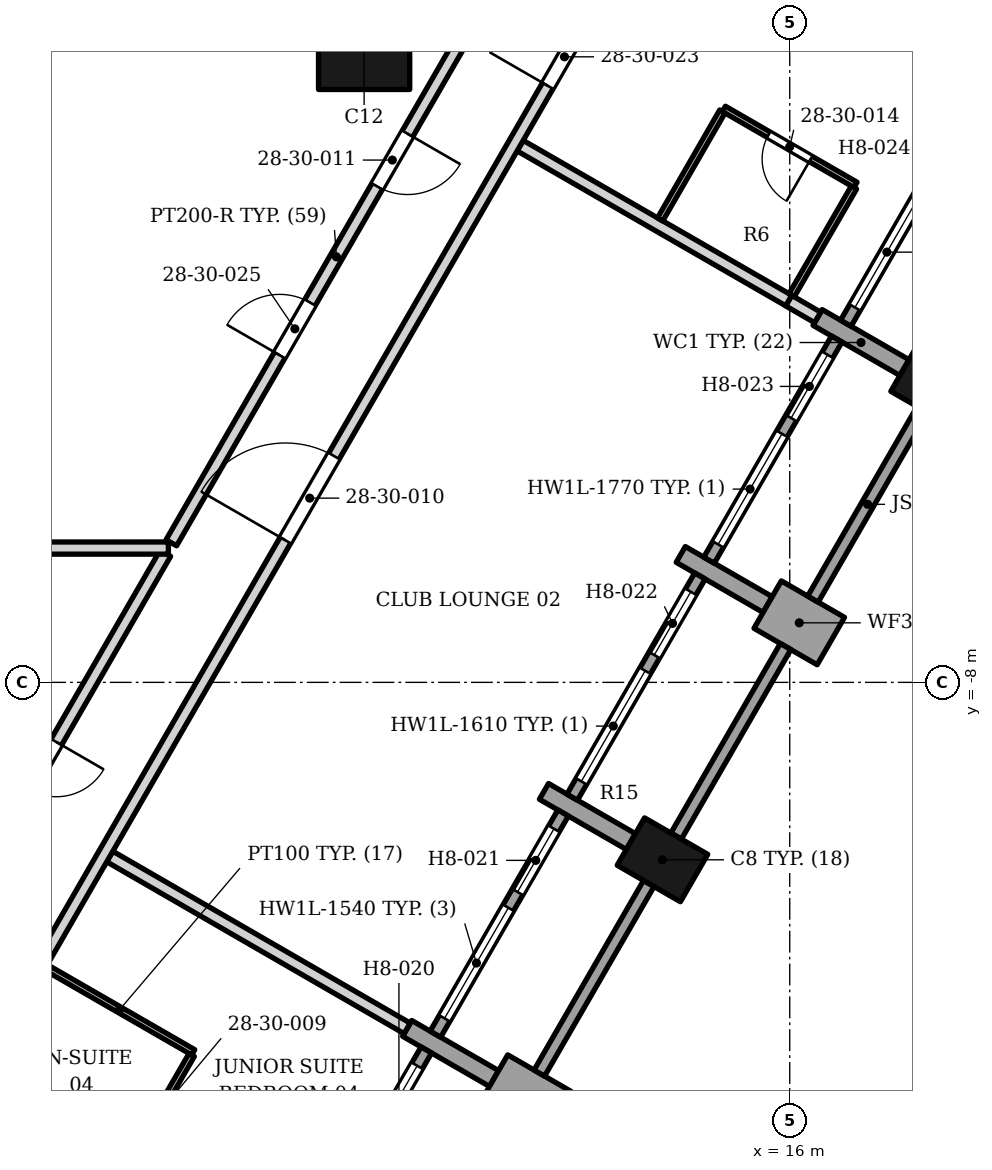
"""IFC4 building model, lengths in metres.
Left out: names, types, materials, properties, quantities, classifications, styles, units other than length and angle.
Written with IfcOpenShell. Run it as: python <this file> out.ifc"""

import sys

from ifc_helpers import new_model, si_unit, direction, frame, frame_2d, origin, origin_2d, place, context, subcontext, project, spatial, rectangle, extrude, element, fill, save


model = new_model("IFC4")
c1 = context("Model", 3, precision=1e-05, world=origin(), true_north=direction((0.0, 1.0)))
c2 = subcontext(c1, "Body", "Model", "MODEL_VIEW")
j1 = project(units=[si_unit("LENGTHUNIT", "METRE"), si_unit("PLANEANGLEUNIT", "RADIAN")], contexts=[c1])
p1 = place(None, origin())
s1 = spatial("IfcSite", under=j1, at=p1, CompositionType="ELEMENT")
p2 = place(p1, origin())
s2 = spatial("IfcBuilding", under=s1, at=p2, CompositionType="ELEMENT")
p3 = place(p2, frame((0.0, 0.0, 122.4)))
s3 = spatial("IfcBuildingStorey", under=s2, at=p3, CompositionType="ELEMENT", Elevation=122.4)
p4 = place(p3, frame((9.0, 2.5, 0.0), z_axis=(0.0, 0.0, 1.0), x_axis=(1.0, 0.0, 0.0)))
e1 = element("IfcColumn", 1, at=p4, inside=s3, PredefinedType="COLUMN", context=c2, shape_type="SweptSolid", body=[
    extrude(rectangle(XDim=1.5, YDim=1.5, at=origin_2d()), origin(), (0.0, 0.0, 1.0), 3.4),
])
for number, where, z_axis, x_axis in (
    (2, (13.907, -10.918, 0.0), (0.0, 0.0, 1.0), (0.5, 0.866, 0.0)),
    (3, (18.407, -3.124, 0.0), (0.0, 0.0, 1.0), (0.5, 0.866, 0.0)),
):
    element("IfcColumn", number, at=place(p3, frame(where, z_axis=z_axis, x_axis=x_axis)), inside=s3, PredefinedType="COLUMN", context=c2, shape_type="SweptSolid", body=[
        extrude(rectangle(XDim=0.9, YDim=1.2, at=origin_2d()), origin(), (0.0, 0.0, 1.0), 3.4),
    ])
p5 = place(p3, frame((12.176, -15.115, 0.0), z_axis=(0.0, 0.0, 1.0), x_axis=(-0.866094119867, 0.499880961361, 0.0)))
e4 = element("IfcWall", 4, at=p5, inside=s3, PredefinedType="SOLIDWALL", context=c2, shape_type="SweptSolid", body=[
    extrude(rectangle(XDim=1.2, YDim=0.9, at=frame_2d((0.6, 0.0))), origin(), (0.0, 0.0, 1.0), 2.63),
])
p6 = place(p3, frame((9.708, -13.69, 0.0), z_axis=(0.0, 0.0, 1.0), x_axis=(0.866040211805, -0.499974350878, 0.0)))
e5 = element("IfcWall", 5, at=p6, inside=s3, PredefinedType="SOLIDWALL", context=c2, shape_type="SweptSolid", body=[
    extrude(rectangle(XDim=1.65, YDim=0.3, at=frame_2d((0.825, 0.0))), origin(), (0.0, 0.0, 1.0), 2.65),
])
p7 = place(p3, frame((11.958, -9.793, 0.0), z_axis=(0.0, 0.0, 1.0), x_axis=(0.866040211805, -0.499974350878, 0.0)))
e6 = element("IfcWall", 6, at=p7, inside=s3, PredefinedType="SOLIDWALL", context=c2, shape_type="SweptSolid", body=[
    extrude(rectangle(XDim=1.65, YDim=0.3, at=frame_2d((0.825, 0.0))), origin(), (0.0, 0.0, 1.0), 2.308),
])
p8 = place(p3, frame((15.637, -6.721, 0.0), z_axis=(0.0, 0.0, 1.0), x_axis=(0.866094119867, -0.499880961361, 0.0)))
e7 = element("IfcWall", 7, at=p8, inside=s3, PredefinedType="SOLIDWALL", context=c2, shape_type="SweptSolid", body=[
    extrude(rectangle(XDim=1.2, YDim=0.9, at=frame_2d((0.6, 0.0))), origin(), (0.0, 0.0, 1.0), 2.474),
])
p9 = place(p3, frame((15.637, -6.721, 0.0), z_axis=(0.0, 0.0, 1.0), x_axis=(-0.865976140824, 0.500085316245, 0.0)))
e8 = element("IfcWall", 8, at=p9, inside=s3, PredefinedType="SOLIDWALL", context=c2, shape_type="SweptSolid", body=[
    extrude(rectangle(XDim=1.65, YDim=0.3, at=frame_2d((0.825, 0.0))), origin(), (0.0, 0.0, 1.0), 2.474),
])
p10 = place(p3, frame((16.458, -1.999, 0.0), z_axis=(0.0, 0.0, 1.0), x_axis=(0.866040211805, -0.499974350878, 0.0)))
e9 = element("IfcWall", 9, at=p10, inside=s3, PredefinedType="SOLIDWALL", context=c2, shape_type="SweptSolid", body=[
    extrude(rectangle(XDim=1.65, YDim=0.3, at=frame_2d((0.825, 0.0))), origin(), (0.0, 0.0, 1.0), 2.65),
])
p11 = place(p3, frame((7.923, -17.682, 0.0), z_axis=(0.0, 0.0, 1.0), x_axis=(0.499958946799, 0.866049104564, 0.0)))
e10 = element("IfcWall", 10, at=p11, inside=s3, PredefinedType="ELEMENTEDWALL", context=c2, shape_type="SweptSolid", body=[
    extrude(rectangle(XDim=4.2, YDim=0.2, at=frame_2d((2.1, 0.0))), origin(), (0.0, 0.0, 1.0), 2.65),
])
p12 = place(p11, frame((0.3, 0.0, 0.6)))
e11 = element("IfcOpeningElement", 11, at=p12, cuts=e10, PredefinedType="OPENING", context=c2, shape_type="SweptSolid", body=[
    extrude(rectangle(XDim=2.1, YDim=1.8, at=frame_2d((1.05, 0.9))), frame((0.0, 0.11, 0.0), z_axis=(0.0, -1.0, 0.0), x_axis=(1.0, 0.0, 0.0)), (0.0, 0.0, 1.0), 0.22),
])
p13 = place(p11, frame((2.7, 0.0, 0.0)))
e12 = element("IfcOpeningElement", 12, at=p13, cuts=e10, PredefinedType="OPENING", context=c2, shape_type="SweptSolid", body=[
    extrude(rectangle(XDim=1.2, YDim=2.4, at=frame_2d((0.6, 1.2))), frame((0.0, 0.11, 0.0), z_axis=(0.0, -1.0, 0.0), x_axis=(1.0, 0.0, 0.0)), (0.0, 0.0, 1.0), 0.22),
])
p14 = place(p3, frame((11.882, -14.425, 0.0), z_axis=(0.0, 0.0, 1.0), x_axis=(0.500012057535, 0.866018442252, 0.0)))
e13 = element("IfcWall", 13, at=p14, inside=s3, PredefinedType="SOLIDWALL", context=c2, shape_type="SweptSolid", body=[
    extrude(rectangle(XDim=3.6, YDim=0.2, at=frame_2d((1.8, 0.0))), origin(), (0.0, 0.0, 1.0), 2.374),
])
p15 = place(p3, frame((10.173, -13.785, 0.0), z_axis=(0.0, 0.0, 1.0), x_axis=(0.49998411664, 0.866034573852, 0.0)))
e14 = element("IfcWall", 14, at=p15, inside=s3, PredefinedType="ELEMENTEDWALL", context=c2, shape_type="SweptSolid", body=[
    extrude(rectangle(XDim=4.2, YDim=0.2, at=frame_2d((2.1, 0.0))), origin(), (0.0, 0.0, 1.0), 2.242),
])
p16 = place(p15, frame((0.3, 0.0, 0.6)))
e15 = element("IfcOpeningElement", 15, at=p16, cuts=e14, PredefinedType="OPENING", context=c2, shape_type="SweptSolid", body=[
    extrude(rectangle(XDim=2.1, YDim=1.54, at=frame_2d((1.05, 0.77))), frame((0.0, 0.11, 0.0), z_axis=(0.0, -1.0, 0.0), x_axis=(1.0, 0.0, 0.0)), (0.0, 0.0, 1.0), 0.22),
])
p17 = place(p15, frame((2.7, 0.0, 0.0)))
e16 = element("IfcOpeningElement", 16, at=p17, cuts=e14, PredefinedType="OPENING", context=c2, shape_type="SweptSolid", body=[
    extrude(rectangle(XDim=1.2, YDim=2.14, at=frame_2d((0.6, 1.07))), frame((0.0, 0.11, 0.0), z_axis=(0.0, -1.0, 0.0), x_axis=(1.0, 0.0, 0.0)), (0.0, 0.0, 1.0), 0.22),
])
p18 = place(p3, frame((14.132, -10.528, 0.0), z_axis=(0.0, 0.0, 1.0), x_axis=(0.500012057535, 0.866018442252, 0.0)))
e17 = element("IfcWall", 17, at=p18, inside=s3, PredefinedType="SOLIDWALL", context=c2, shape_type="SweptSolid", body=[
    extrude(rectangle(XDim=3.6, YDim=0.2, at=frame_2d((1.8, 0.0))), origin(), (0.0, 0.0, 1.0), 2.63),
])
p19 = place(p3, frame((12.423, -9.888, 0.0), z_axis=(0.0, 0.0, 1.0), x_axis=(0.49998411664, 0.866034573852, 0.0)))
e18 = element("IfcWall", 18, at=p19, inside=s3, PredefinedType="ELEMENTEDWALL", context=c2, shape_type="SweptSolid", body=[
    extrude(rectangle(XDim=4.2, YDim=0.2, at=frame_2d((2.1, 0.0))), origin(), (0.0, 0.0, 1.0), 2.308),
])
p20 = place(p19, frame((0.3, 0.0, 0.6)))
e19 = element("IfcOpeningElement", 19, at=p20, cuts=e18, PredefinedType="OPENING", context=c2, shape_type="SweptSolid", body=[
    extrude(rectangle(XDim=2.1, YDim=1.61, at=frame_2d((1.05, 0.805))), frame((0.0, 0.11, 0.0), z_axis=(0.0, -1.0, 0.0), x_axis=(1.0, 0.0, 0.0)), (0.0, 0.0, 1.0), 0.22),
])
p21 = place(p19, frame((2.7, 0.0, 0.0)))
e20 = element("IfcOpeningElement", 20, at=p21, cuts=e18, PredefinedType="OPENING", context=c2, shape_type="SweptSolid", body=[
    extrude(rectangle(XDim=1.2, YDim=2.21, at=frame_2d((0.6, 1.105))), frame((0.0, 0.11, 0.0), z_axis=(0.0, -1.0, 0.0), x_axis=(1.0, 0.0, 0.0)), (0.0, 0.0, 1.0), 0.22),
])
p22 = place(p3, frame((16.382, -6.631, 0.0), z_axis=(0.0, 0.0, 1.0), x_axis=(0.500012057535, 0.866018442252, 0.0)))
e21 = element("IfcWall", 21, at=p22, inside=s3, PredefinedType="SOLIDWALL", context=c2, shape_type="SweptSolid", body=[
    extrude(rectangle(XDim=3.6, YDim=0.2, at=frame_2d((1.8, 0.0))), origin(), (0.0, 0.0, 1.0), 2.63),
])
p23 = place(p3, frame((14.673, -5.991, 0.0), z_axis=(0.0, 0.0, 1.0), x_axis=(0.499958946799, 0.866049104564, 0.0)))
e22 = element("IfcWall", 22, at=p23, inside=s3, PredefinedType="ELEMENTEDWALL", context=c2, shape_type="SweptSolid", body=[
    extrude(rectangle(XDim=4.2, YDim=0.2, at=frame_2d((2.1, 0.0))), origin(), (0.0, 0.0, 1.0), 2.474),
])
p24 = place(p23, frame((0.3, 0.0, 0.6)))
e23 = element("IfcOpeningElement", 23, at=p24, cuts=e22, PredefinedType="OPENING", context=c2, shape_type="SweptSolid", body=[
    extrude(rectangle(XDim=2.1, YDim=1.77, at=frame_2d((1.05, 0.885))), frame((0.0, 0.11, 0.0), z_axis=(0.0, -1.0, 0.0), x_axis=(1.0, 0.0, 0.0)), (0.0, 0.0, 1.0), 0.22),
])
p25 = place(p23, frame((2.7, 0.0, 0.0)))
e24 = element("IfcOpeningElement", 24, at=p25, cuts=e22, PredefinedType="OPENING", context=c2, shape_type="SweptSolid", body=[
    extrude(rectangle(XDim=1.2, YDim=2.37, at=frame_2d((0.6, 1.185))), frame((0.0, 0.11, 0.0), z_axis=(0.0, -1.0, 0.0), x_axis=(1.0, 0.0, 0.0)), (0.0, 0.0, 1.0), 0.22),
])
p26 = place(p3, frame((16.923, -2.094, 0.0), z_axis=(0.0, 0.0, 1.0), x_axis=(0.49998411664, 0.866034573852, 0.0)))
e25 = element("IfcWall", 25, at=p26, inside=s3, PredefinedType="ELEMENTEDWALL", context=c2, shape_type="SweptSolid", body=[
    extrude(rectangle(XDim=4.2, YDim=0.2, at=frame_2d((2.1, 0.0))), origin(), (0.0, 0.0, 1.0), 2.65),
])
p27 = place(p26, frame((0.3, 0.0, 0.6)))
e26 = element("IfcOpeningElement", 26, at=p27, cuts=e25, PredefinedType="OPENING", context=c2, shape_type="SweptSolid", body=[
    extrude(rectangle(XDim=2.1, YDim=1.8, at=frame_2d((1.05, 0.9))), frame((0.0, 0.11, 0.0), z_axis=(0.0, -1.0, 0.0), x_axis=(1.0, 0.0, 0.0)), (0.0, 0.0, 1.0), 0.22),
])
p28 = place(p26, frame((2.7, 0.0, 0.0)))
e27 = element("IfcOpeningElement", 27, at=p28, cuts=e25, PredefinedType="OPENING", context=c2, shape_type="SweptSolid", body=[
    extrude(rectangle(XDim=1.2, YDim=2.4, at=frame_2d((0.6, 1.2))), frame((0.0, 0.11, 0.0), z_axis=(0.0, -1.0, 0.0), x_axis=(1.0, 0.0, 0.0)), (0.0, 0.0, 1.0), 0.22),
])
p29 = place(p3, frame((5.014, -16.116, 0.0), z_axis=(0.0, 0.0, 1.0), x_axis=(0.500617411337, 0.865668647617, 0.0)))
e28 = element("IfcWall", 28, at=p29, inside=s3, PredefinedType="PARTITIONING", context=c2, shape_type="SweptSolid", body=[
    extrude(rectangle(XDim=2.298, YDim=0.1, at=frame_2d((1.149, 0.0))), origin(), (0.0, 0.0, 1.0), 3.23),
])
p30 = place(p29, frame((0.748, 0.0, 0.0)))
e29 = element("IfcOpeningElement", 29, at=p30, cuts=e28, PredefinedType="OPENING", context=c2, shape_type="SweptSolid", body=[
    extrude(rectangle(XDim=0.8, YDim=2.1, at=frame_2d((0.4, 1.05))), frame((0.0, 0.06, 0.0), z_axis=(0.0, -1.0, 0.0), x_axis=(1.0, 0.0, 0.0)), (0.0, 0.0, 1.0), 0.12),
])
p31 = place(p3, frame((3.764, -12.685, 0.0), z_axis=(0.0, 0.0, 1.0), x_axis=(0.866326367614, -0.499478352661, 0.0)))
e30 = element("IfcWall", 30, at=p31, inside=s3, PredefinedType="PARTITIONING", context=c2, shape_type="SweptSolid", body=[
    extrude(rectangle(XDim=2.8, YDim=0.1, at=frame_2d((1.4, 0.0))), origin(), (0.0, 0.0, 1.0), 2.384),
])
p32 = place(p3, frame((1.647, -12.948, 0.0), z_axis=(0.0, 0.0, 1.0), x_axis=(0.500209850425, 0.865904212681, 0.0)))
e31 = element("IfcWall", 31, at=p32, inside=s3, PredefinedType="PARTITIONING", context=c2, shape_type="SweptSolid", body=[
    extrude(rectangle(XDim=8.166, YDim=0.2, at=frame_2d((4.083, 0.0))), origin(), (0.0, 0.0, 1.0), 2.242),
])
p33 = place(p32, frame((3.682, 0.0, 0.0)))
e32 = element("IfcOpeningElement", 32, at=p33, cuts=e31, PredefinedType="OPENING", context=c2, shape_type="SweptSolid", body=[
    extrude(rectangle(XDim=0.9, YDim=2.1, at=frame_2d((0.45, 1.05))), frame((0.0, 0.11, 0.0), z_axis=(0.0, -1.0, 0.0), x_axis=(1.0, 0.0, 0.0)), (0.0, 0.0, 1.0), 0.22),
])
p34 = place(p3, frame((4.816, -10.864, 0.0), z_axis=(0.0, 0.0, 1.0), x_axis=(0.865863825321, -0.500279757735, 0.0)))
e33 = element("IfcWall", 33, at=p34, inside=s3, PredefinedType="PARTITIONING", context=c2, shape_type="SweptSolid", body=[
    extrude(rectangle(XDim=5.65, YDim=0.2, at=frame_2d((2.825, 0.0))), origin(), (0.0, 0.0, 1.0), 2.242),
])
p35 = place(p3, frame((-5.812, -5.793, 0.0), z_axis=(0.0, 0.0, 1.0), x_axis=(0.999999989135, 0.000147408763, 0.0)))
e34 = element("IfcWall", 34, at=p35, inside=s3, PredefinedType="PARTITIONING", context=c2, shape_type="SweptSolid", body=[
    extrude(rectangle(XDim=11.594, YDim=0.2, at=frame_2d((5.797, 0.0))), origin(), (0.0, 0.0, 1.0), 3.23),
])
p36 = place(p3, frame((5.829, -5.705, 0.0), z_axis=(0.0, 0.0, 1.0), x_axis=(0.500142759665, 0.865942965763, 0.0)))
e35 = element("IfcWall", 35, at=p36, inside=s3, PredefinedType="PARTITIONING", context=c2, shape_type="SweptSolid", body=[
    extrude(rectangle(XDim=10.86, YDim=0.2, at=frame_2d((5.43, 0.0))), origin(), (0.0, 0.0, 1.0), 2.242),
])
p37 = place(p36, frame((6.768, 0.0, 0.0)))
e36 = element("IfcOpeningElement", 36, at=p37, cuts=e35, PredefinedType="OPENING", context=c2, shape_type="SweptSolid", body=[
    extrude(rectangle(XDim=1.0, YDim=2.1, at=frame_2d((0.5, 1.05))), frame((0.0, 0.11, 0.0), z_axis=(0.0, -1.0, 0.0), x_axis=(1.0, 0.0, 0.0)), (0.0, 0.0, 1.0), 0.22),
])
p38 = place(p36, frame((3.563, 0.0, 0.0)))
e37 = element("IfcOpeningElement", 37, at=p38, cuts=e35, PredefinedType="OPENING", context=c2, shape_type="SweptSolid", body=[
    extrude(rectangle(XDim=1.0, YDim=2.1, at=frame_2d((0.5, 1.05))), frame((0.0, 0.11, 0.0), z_axis=(0.0, -1.0, 0.0), x_axis=(1.0, 0.0, 0.0)), (0.0, 0.0, 1.0), 0.22),
])
p39 = place(p3, frame((15.983, -1.722, 0.0), z_axis=(0.0, 0.0, 1.0), x_axis=(0.864695615284, -0.502296220281, 0.0)))
e38 = element("IfcWall", 38, at=p39, inside=s3, PredefinedType="PARTITIONING", context=c2, shape_type="SweptSolid", body=[
    extrude(rectangle(XDim=0.55, YDim=0.2, at=frame_2d((0.275, 0.0))), origin(), (0.0, 0.0, 1.0), 3.23),
])
p40 = place(p3, frame((11.566, 0.826, 0.0), z_axis=(0.0, 0.0, 1.0), x_axis=(0.866318662666, -0.499491716364, 0.0)))
e39 = element("IfcWall", 39, at=p40, inside=s3, PredefinedType="PARTITIONING", context=c2, shape_type="SweptSolid", body=[
    extrude(rectangle(XDim=5.099, YDim=0.2, at=frame_2d((2.55, 0.0))), origin(), (0.0, 0.0, 1.0), 2.308),
])
p41 = place(p3, frame((16.031, -1.636, 0.0), z_axis=(0.0, 0.0, 1.0), x_axis=(0.500646589026, 0.865651773461, 0.0)))
e40 = element("IfcWall", 40, at=p41, inside=s3, PredefinedType="PARTITIONING", context=c2, shape_type="SweptSolid", body=[
    extrude(rectangle(XDim=2.05, YDim=0.1, at=frame_2d((1.025, 0.0))), origin(), (0.0, 0.0, 1.0), 3.23),
])
p42 = place(p3, frame((14.917, 1.432, 0.0), z_axis=(0.0, 0.0, 1.0), x_axis=(0.866022959057, -0.500004234368, 0.0)))
e41 = element("IfcWall", 41, at=p42, inside=s3, PredefinedType="PARTITIONING", context=c2, shape_type="SweptSolid", body=[
    extrude(rectangle(XDim=2.5, YDim=0.1, at=frame_2d((1.25, 0.0))), origin(), (0.0, 0.0, 1.0), 2.474),
])
p43 = place(p42, frame((0.85, 0.0, 0.0)))
e42 = element("IfcOpeningElement", 42, at=p43, cuts=e41, PredefinedType="OPENING", context=c2, shape_type="SweptSolid", body=[
    extrude(rectangle(XDim=0.8, YDim=2.1, at=frame_2d((0.4, 1.05))), frame((0.0, 0.06, 0.0), z_axis=(0.0, -1.0, 0.0), x_axis=(1.0, 0.0, 0.0)), (0.0, 0.0, 1.0), 0.12),
])
p44 = place(p3, frame((13.868, -0.387, 0.0), z_axis=(0.0, 0.0, 1.0), x_axis=(0.499265284884, 0.866449176415, 0.0)))
e43 = element("IfcWall", 43, at=p44, inside=s3, PredefinedType="PARTITIONING", context=c2, shape_type="SweptSolid", body=[
    extrude(rectangle(XDim=2.05, YDim=0.1, at=frame_2d((1.025, 0.0))), origin(), (0.0, 0.0, 1.0), 3.23),
])
p45 = place(p3, frame((0.23, -18.61, 0.0), z_axis=(0.0, 0.0, 1.0), x_axis=(0.499999197515, 0.866025867099, 0.0)))
e44 = element("IfcWall", 44, at=p45, inside=s3, PredefinedType="PARTITIONING", context=c2, shape_type="SweptSolid", body=[
    extrude(rectangle(XDim=25.76, YDim=0.2, at=frame_2d((12.88, 0.0))), origin(), (0.0, 0.0, 1.0), 2.242),
])
p46 = place(p45, frame((0.8, 0.0, 0.0)))
e45 = element("IfcOpeningElement", 45, at=p46, cuts=e44, PredefinedType="OPENING", context=c2, shape_type="SweptSolid", body=[
    extrude(rectangle(XDim=1.1, YDim=2.1, at=frame_2d((0.55, 1.05))), frame((0.0, 0.11, 0.0), z_axis=(0.0, -1.0, 0.0), x_axis=(1.0, 0.0, 0.0)), (0.0, 0.0, 1.0), 0.22),
])
p47 = place(p45, frame((14.95, 0.0, 0.0)))
e46 = element("IfcOpeningElement", 46, at=p47, cuts=e44, PredefinedType="OPENING", context=c2, shape_type="SweptSolid", body=[
    extrude(rectangle(XDim=1.6, YDim=2.1, at=frame_2d((0.8, 1.05))), frame((0.0, 0.11, 0.0), z_axis=(0.0, -1.0, 0.0), x_axis=(1.0, 0.0, 0.0)), (0.0, 0.0, 1.0), 0.22),
])
p48 = place(p45, frame((23.58, 0.0, 0.0)))
e47 = element("IfcOpeningElement", 47, at=p48, cuts=e44, PredefinedType="OPENING", context=c2, shape_type="SweptSolid", body=[
    extrude(rectangle(XDim=1.1, YDim=2.1, at=frame_2d((0.55, 1.05))), frame((0.0, 0.11, 0.0), z_axis=(0.0, -1.0, 0.0), x_axis=(1.0, 0.0, 0.0)), (0.0, 0.0, 1.0), 0.22),
])
p49 = place(p13, origin())
e48 = element("IfcDoor", 48, at=p49, inside=s3, OperationType="SINGLE_SWING_LEFT", PredefinedType="DOOR", context=c2, shape_type="SweptSolid", body=[
    extrude(rectangle(XDim=1.2, YDim=2.4, at=frame_2d((0.6, 1.2))), frame((0.0, 0.025, 0.0), z_axis=(0.0, -1.0, 0.0), x_axis=(1.0, 0.0, 0.0)), (0.0, 0.0, 1.0), 0.05),
])
fill(e12, e48)
p50 = place(p16, origin())
e49 = element("IfcWindow", 49, at=p50, inside=s3, PartitioningType="SINGLE_PANEL", PredefinedType="WINDOW", context=c2, shape_type="SweptSolid", body=[
    extrude(rectangle(XDim=2.1, YDim=1.54, at=frame_2d((1.05, 0.77))), frame((0.0, 0.03, 0.0), z_axis=(0.0, -1.0, 0.0), x_axis=(1.0, 0.0, 0.0)), (0.0, 0.0, 1.0), 0.06),
])
fill(e15, e49)
p51 = place(p17, origin())
e50 = element("IfcDoor", 50, at=p51, inside=s3, OperationType="SINGLE_SWING_LEFT", PredefinedType="DOOR", context=c2, shape_type="SweptSolid", body=[
    extrude(rectangle(XDim=1.2, YDim=2.14, at=frame_2d((0.6, 1.07))), frame((0.0, 0.025, 0.0), z_axis=(0.0, -1.0, 0.0), x_axis=(1.0, 0.0, 0.0)), (0.0, 0.0, 1.0), 0.05),
])
fill(e16, e50)
p52 = place(p20, origin())
e51 = element("IfcWindow", 51, at=p52, inside=s3, PartitioningType="SINGLE_PANEL", PredefinedType="WINDOW", context=c2, shape_type="SweptSolid", body=[
    extrude(rectangle(XDim=2.1, YDim=1.61, at=frame_2d((1.05, 0.805))), frame((0.0, 0.03, 0.0), z_axis=(0.0, -1.0, 0.0), x_axis=(1.0, 0.0, 0.0)), (0.0, 0.0, 1.0), 0.06),
])
fill(e19, e51)
p53 = place(p21, origin())
e52 = element("IfcDoor", 52, at=p53, inside=s3, OperationType="SINGLE_SWING_LEFT", PredefinedType="DOOR", context=c2, shape_type="SweptSolid", body=[
    extrude(rectangle(XDim=1.2, YDim=2.21, at=frame_2d((0.6, 1.105))), frame((0.0, 0.025, 0.0), z_axis=(0.0, -1.0, 0.0), x_axis=(1.0, 0.0, 0.0)), (0.0, 0.0, 1.0), 0.05),
])
fill(e20, e52)
p54 = place(p24, origin())
e53 = element("IfcWindow", 53, at=p54, inside=s3, PartitioningType="SINGLE_PANEL", PredefinedType="WINDOW", context=c2, shape_type="SweptSolid", body=[
    extrude(rectangle(XDim=2.1, YDim=1.77, at=frame_2d((1.05, 0.885))), frame((0.0, 0.03, 0.0), z_axis=(0.0, -1.0, 0.0), x_axis=(1.0, 0.0, 0.0)), (0.0, 0.0, 1.0), 0.06),
])
fill(e23, e53)
p55 = place(p25, origin())
e54 = element("IfcDoor", 54, at=p55, inside=s3, OperationType="SINGLE_SWING_LEFT", PredefinedType="DOOR", context=c2, shape_type="SweptSolid", body=[
    extrude(rectangle(XDim=1.2, YDim=2.37, at=frame_2d((0.6, 1.185))), frame((0.0, 0.025, 0.0), z_axis=(0.0, -1.0, 0.0), x_axis=(1.0, 0.0, 0.0)), (0.0, 0.0, 1.0), 0.05),
])
fill(e24, e54)
p56 = place(p27, origin())
e55 = element("IfcWindow", 55, at=p56, inside=s3, PartitioningType="SINGLE_PANEL", PredefinedType="WINDOW", context=c2, shape_type="SweptSolid", body=[
    extrude(rectangle(XDim=2.1, YDim=1.8, at=frame_2d((1.05, 0.9))), frame((0.0, 0.03, 0.0), z_axis=(0.0, -1.0, 0.0), x_axis=(1.0, 0.0, 0.0)), (0.0, 0.0, 1.0), 0.06),
])
fill(e26, e55)
p57 = place(p47, origin())
e56 = element("IfcDoor", 56, at=p57, inside=s3, OperationType="DOUBLE_DOOR_SINGLE_SWING", PredefinedType="DOOR", context=c2, shape_type="SweptSolid", body=[
    extrude(rectangle(XDim=1.6, YDim=2.1, at=frame_2d((0.8, 1.05))), frame((0.0, 0.025, 0.0), z_axis=(0.0, -1.0, 0.0), x_axis=(1.0, 0.0, 0.0)), (0.0, 0.0, 1.0), 0.05),
])
fill(e46, e56)
p58 = place(p37, origin())
e57 = element("IfcDoor", 57, at=p58, inside=s3, OperationType="SINGLE_SWING_RIGHT", PredefinedType="DOOR", context=c2, shape_type="SweptSolid", body=[
    extrude(rectangle(XDim=1.0, YDim=2.1, at=frame_2d((0.5, 1.05))), frame((0.0, 0.025, 0.0), z_axis=(0.0, -1.0, 0.0), x_axis=(1.0, 0.0, 0.0)), (0.0, 0.0, 1.0), 0.05),
])
fill(e36, e57)
p59 = place(p33, origin())
e58 = element("IfcDoor", 58, at=p59, inside=s3, OperationType="SINGLE_SWING_RIGHT", PredefinedType="DOOR", context=c2, shape_type="SweptSolid", body=[
    extrude(rectangle(XDim=0.9, YDim=2.1, at=frame_2d((0.45, 1.05))), frame((0.0, 0.025, 0.0), z_axis=(0.0, -1.0, 0.0), x_axis=(1.0, 0.0, 0.0)), (0.0, 0.0, 1.0), 0.05),
])
fill(e32, e58)
p60 = place(p43, origin())
e59 = element("IfcDoor", 59, at=p60, inside=s3, OperationType="SINGLE_SWING_RIGHT", PredefinedType="DOOR", context=c2, shape_type="SweptSolid", body=[
    extrude(rectangle(XDim=0.8, YDim=2.1, at=frame_2d((0.4, 1.05))), frame((0.0, 0.025, 0.0), z_axis=(0.0, -1.0, 0.0), x_axis=(1.0, 0.0, 0.0)), (0.0, 0.0, 1.0), 0.05),
])
fill(e42, e59)
p61 = place(p48, origin())
e60 = element("IfcDoor", 60, at=p61, inside=s3, OperationType="SINGLE_SWING_LEFT", PredefinedType="DOOR", context=c2, shape_type="SweptSolid", body=[
    extrude(rectangle(XDim=1.1, YDim=2.1, at=frame_2d((0.55, 1.05))), frame((0.0, 0.025, 0.0), z_axis=(0.0, -1.0, 0.0), x_axis=(1.0, 0.0, 0.0)), (0.0, 0.0, 1.0), 0.05),
])
fill(e47, e60)
p62 = place(p38, origin())
e61 = element("IfcDoor", 61, at=p62, inside=s3, OperationType="SINGLE_SWING_LEFT", PredefinedType="DOOR", context=c2, shape_type="SweptSolid", body=[
    extrude(rectangle(XDim=1.0, YDim=2.1, at=frame_2d((0.5, 1.05))), frame((0.0, 0.025, 0.0), z_axis=(0.0, -1.0, 0.0), x_axis=(1.0, 0.0, 0.0)), (0.0, 0.0, 1.0), 0.05),
])
fill(e37, e61)
save(model, sys.argv[1])
